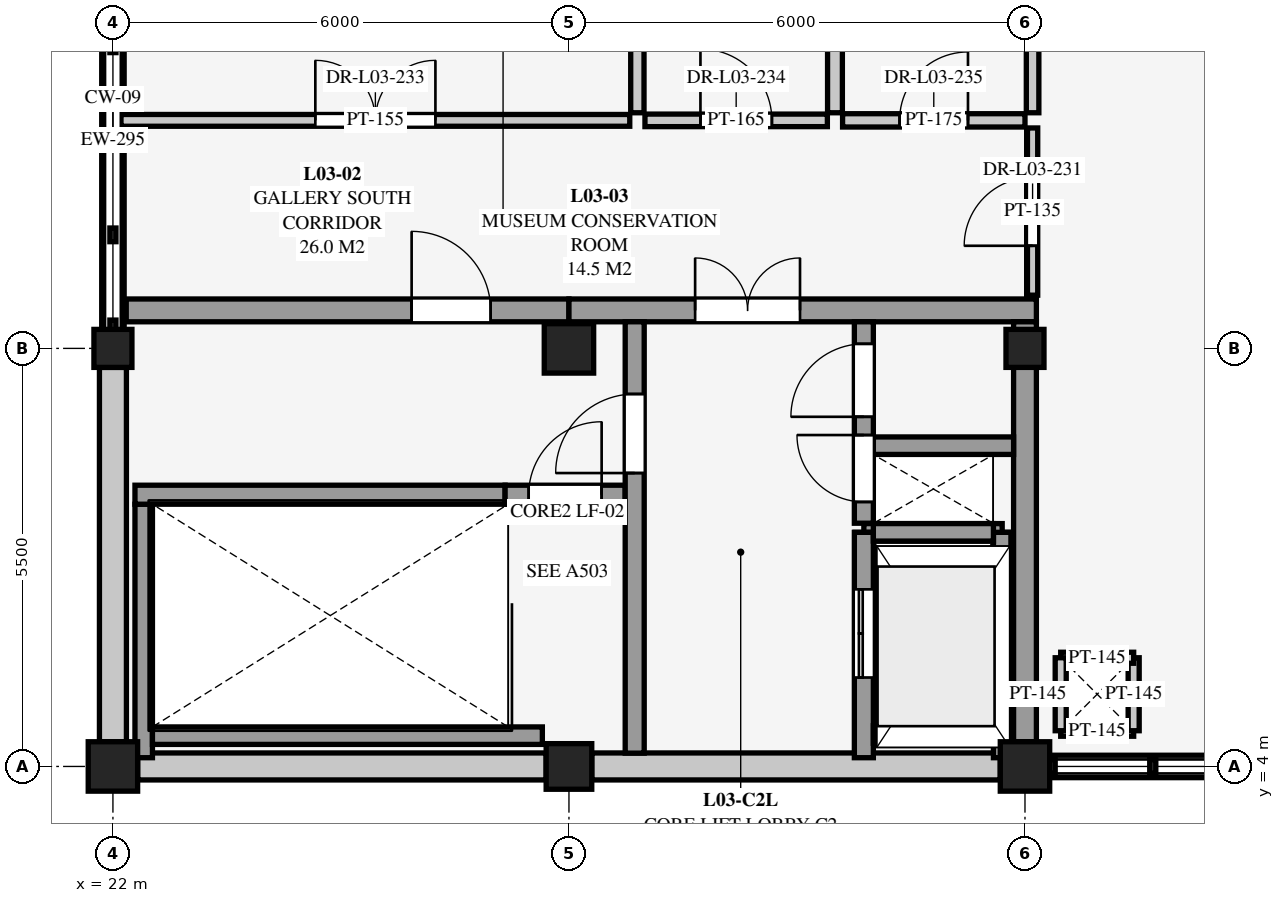
"""IFC4 building model, lengths in metres.
Left out: names, types, materials, properties, quantities, classifications, styles, units other than length and angle.
Written with IfcOpenShell. Run it as: python <this file> out.ifc"""

import sys

from ifc_helpers import new_model, si_unit, direction, frame, frame_2d, origin, origin_2d, place, context, subcontext, project, spatial, rectangle, extrude, element, fill, save


model = new_model("IFC4")
c1 = context("Model", 3, precision=1e-05, world=origin(), true_north=direction((0.0, 1.0)))
c2 = subcontext(c1, "Body", "Model", "MODEL_VIEW")
j1 = project(units=[si_unit("LENGTHUNIT", "METRE"), si_unit("PLANEANGLEUNIT", "RADIAN")], contexts=[c1])
p1 = place(None, origin())
s1 = spatial("IfcSite", under=j1, at=p1, CompositionType="ELEMENT")
p2 = place(p1, origin())
s2 = spatial("IfcBuilding", under=s1, at=p2, CompositionType="ELEMENT")
p3 = place(p2, frame((0.0, 0.0, 9.0)))
s3 = spatial("IfcBuildingStorey", under=s2, at=p3, CompositionType="ELEMENT", Elevation=9.0)
p4 = place(p3, frame((22.0, 4.0, 0.0), z_axis=(0.0, 0.0, 1.0), x_axis=(1.0, 0.0, 0.0)))
e1 = element("IfcColumn", 1, at=p4, inside=s3, PredefinedType="COLUMN", context=c2, shape_type="SweptSolid", body=[
    extrude(rectangle(XDim=0.65, YDim=0.65, at=origin_2d()), origin(), (0.0, 0.0, 1.0), 4.5),
])
p5 = place(p3, frame((22.0, 9.5, 0.0), z_axis=(0.0, 0.0, 1.0), x_axis=(1.0, 0.0, 0.0)))
e2 = element("IfcColumn", 2, at=p5, inside=s3, PredefinedType="COLUMN", context=c2, shape_type="SweptSolid", body=[
    extrude(rectangle(XDim=0.5, YDim=0.5, at=origin_2d()), origin(), (0.0, 0.0, 1.0), 4.5),
])
p6 = place(p3, frame((28.0, 4.0, 0.0), z_axis=(0.0, 0.0, 1.0), x_axis=(1.0, 0.0, 0.0)))
e3 = element("IfcColumn", 3, at=p6, inside=s3, PredefinedType="COLUMN", context=c2, shape_type="SweptSolid", body=[
    extrude(rectangle(XDim=0.6, YDim=0.6, at=origin_2d()), origin(), (0.0, 0.0, 1.0), 4.5),
])
for number, where, z_axis, x_axis in (
    (4, (28.0, 9.5, 0.0), (0.0, 0.0, 1.0), (1.0, 0.0, 0.0)),
    (5, (34.0, 4.0, 0.0), (0.0, 0.0, 1.0), (1.0, 0.0, 0.0)),
):
    element("IfcColumn", number, at=place(p3, frame(where, z_axis=z_axis, x_axis=x_axis)), inside=s3, PredefinedType="COLUMN", context=c2, shape_type="SweptSolid", body=[
        extrude(rectangle(XDim=0.65, YDim=0.65, at=origin_2d()), origin(), (0.0, 0.0, 1.0), 4.5),
    ])
p7 = place(p3, frame((34.0, 9.5, 0.0), z_axis=(0.0, 0.0, 1.0), x_axis=(1.0, 0.0, 0.0)))
e6 = element("IfcColumn", 6, at=p7, inside=s3, PredefinedType="COLUMN", context=c2, shape_type="SweptSolid", body=[
    extrude(rectangle(XDim=0.5, YDim=0.5, at=origin_2d()), origin(), (0.0, 0.0, 1.0), 4.5),
])
for number, where, z_axis, x_axis in (
    (7, (27.7, 4.0, 0.0), (0.0, 0.0, 1.0), (-1.0, 0.0, 0.0)),
    (8, (33.675, 4.0, 0.0), (0.0, 0.0, 1.0), (-1.0, 0.0, 0.0)),
):
    element("IfcWall", number, at=place(p3, frame(where, z_axis=z_axis, x_axis=x_axis)), inside=s3, PredefinedType="SOLIDWALL", context=c2, shape_type="SweptSolid", body=[
        extrude(rectangle(XDim=5.375, YDim=0.355, at=frame_2d((2.688, 0.0))), origin(), (0.0, 0.0, 1.0), 4.093),
    ])
p8 = place(p3, frame((39.75, 4.0, 0.0), z_axis=(0.0, 0.0, 1.0), x_axis=(-1.0, 0.0, 0.0)))
e9 = element("IfcWall", 9, at=p8, inside=s3, PredefinedType="SOLIDWALL", context=c2, shape_type="SweptSolid", body=[
    extrude(rectangle(XDim=5.425, YDim=0.295, at=frame_2d((2.712, 0.0))), origin(), (0.0, 0.0, 1.0), 0.36),
])
p9 = place(p3, frame((22.0, 4.325, 0.0), z_axis=(0.0, 0.0, 1.0), x_axis=(0.0, 1.0, 0.0)))
e10 = element("IfcWall", 10, at=p9, inside=s3, PredefinedType="SOLIDWALL", context=c2, shape_type="SweptSolid", body=[
    extrude(rectangle(XDim=4.925, YDim=0.355, at=frame_2d((2.462, 0.0))), origin(), (0.0, 0.0, 1.0), 4.093),
])
p10 = place(p3, frame((22.0, 9.75, 0.0), z_axis=(0.0, 0.0, 1.0), x_axis=(0.0, 1.0, 0.0)))
e11 = element("IfcWall", 11, at=p10, inside=s3, PredefinedType="SOLIDWALL", context=c2, shape_type="SweptSolid", body=[
    extrude(rectangle(XDim=4.975, YDim=0.295, at=frame_2d((2.488, 0.0))), origin(), (0.0, 0.0, 1.0), 0.16),
])
for number, where, z_axis, x_axis in (
    (12, (34.47, 4.47, 0.0), (0.0, 0.0, 1.0), (1.0, 0.0, 0.0)),
    (13, (35.43, 4.47, 0.0), (0.0, 0.0, 1.0), (0.0, 1.0, 0.0)),
    (14, (35.43, 5.43, 0.0), (0.0, 0.0, 1.0), (-1.0, 0.0, 0.0)),
    (15, (34.47, 5.43, 0.0), (0.0, 0.0, 1.0), (0.0, -1.0, 0.0)),
):
    element("IfcWall", number, at=place(p3, frame(where, z_axis=z_axis, x_axis=x_axis)), inside=s3, PredefinedType="PARTITIONING", context=c2, shape_type="SweptSolid", body=[
        extrude(rectangle(XDim=0.96, YDim=0.145, at=frame_2d((0.48, 0.0))), origin(), (0.0, 0.0, 1.0), 4.24),
    ])
p11 = place(p3, frame((31.88, 4.42, 4.5), z_axis=(0.0, 0.0, 1.0), x_axis=(1.0, 0.0, 0.0)))
e16 = element("IfcWall", 16, at=p11, inside=s3, PredefinedType="SHEAR", context=c2, shape_type="SweptSolid", body=[
    extrude(rectangle(XDim=1.82, YDim=0.23, at=frame_2d((0.91, 0.0))), origin(), (0.0, 0.0, 1.0), 1.25),
])
p12 = place(p3, frame((33.7, 4.42, 4.5), z_axis=(0.0, 0.0, 1.0), x_axis=(0.0, 1.0, 0.0)))
e17 = element("IfcWall", 17, at=p12, inside=s3, PredefinedType="SHEAR", context=c2, shape_type="SweptSolid", body=[
    extrude(rectangle(XDim=2.66, YDim=0.23, at=frame_2d((1.33, 0.0))), origin(), (0.0, 0.0, 1.0), 1.25),
])
p13 = place(p3, frame((33.7, 7.08, 4.5), z_axis=(0.0, 0.0, 1.0), x_axis=(-1.0, 0.0, 0.0)))
e18 = element("IfcWall", 18, at=p13, inside=s3, PredefinedType="SHEAR", context=c2, shape_type="SweptSolid", body=[
    extrude(rectangle(XDim=1.82, YDim=0.23, at=frame_2d((0.91, 0.0))), origin(), (0.0, 0.0, 1.0), 1.25),
])
p14 = place(p3, frame((31.88, 7.08, 4.5), z_axis=(0.0, 0.0, 1.0), x_axis=(0.0, -1.0, 0.0)))
e19 = element("IfcWall", 19, at=p14, inside=s3, PredefinedType="SHEAR", context=c2, shape_type="SweptSolid", body=[
    extrude(rectangle(XDim=2.66, YDim=0.23, at=frame_2d((1.33, 0.0))), origin(), (0.0, 0.0, 1.0), 1.25),
])
p15 = place(p3, frame((22.175, 10.0, 0.0), z_axis=(0.0, 0.0, 1.0), x_axis=(1.0, 0.0, 0.0)))
e20 = element("IfcWall", 20, at=p15, inside=s3, PredefinedType="SHEAR", context=c2, shape_type="SweptSolid", body=[
    extrude(rectangle(XDim=5.825, YDim=0.3, at=frame_2d((2.913, 0.0))), origin(), (0.0, 0.0, 1.0), 4.24),
])
p16 = place(p15, frame((3.755, 0.0, 0.0)))
e21 = element("IfcOpeningElement", 21, at=p16, cuts=e20, PredefinedType="OPENING", context=c2, shape_type="SweptSolid", body=[
    extrude(rectangle(XDim=1.04, YDim=2.14, at=frame_2d((0.52, 1.07))), frame((0.0, 0.16, 0.0), z_axis=(0.0, -1.0, 0.0), x_axis=(1.0, 0.0, 0.0)), (0.0, 0.0, 1.0), 0.32),
])
p17 = place(p3, frame((28.0, 10.0, 0.0), z_axis=(0.0, 0.0, 1.0), x_axis=(1.0, 0.0, 0.0)))
e22 = element("IfcWall", 22, at=p17, inside=s3, PredefinedType="SHEAR", context=c2, shape_type="SweptSolid", body=[
    extrude(rectangle(XDim=6.15, YDim=0.3, at=frame_2d((3.075, 0.0))), origin(), (0.0, 0.0, 1.0), 4.24),
])
p18 = place(p17, frame((1.66, 0.0, 0.0)))
e23 = element("IfcOpeningElement", 23, at=p18, cuts=e22, PredefinedType="OPENING", context=c2, shape_type="SweptSolid", body=[
    extrude(rectangle(XDim=1.38, YDim=2.16, at=frame_2d((0.69, 1.08))), frame((0.0, 0.16, 0.0), z_axis=(0.0, -1.0, 0.0), x_axis=(1.0, 0.0, 0.0)), (0.0, 0.0, 1.0), 0.32),
])
p19 = place(p3, frame((34.0, 4.325, 0.0), z_axis=(0.0, 0.0, 1.0), x_axis=(0.0, 1.0, 0.0)))
e24 = element("IfcWall", 24, at=p19, inside=s3, PredefinedType="SHEAR", context=c2, shape_type="SweptSolid", body=[
    extrude(rectangle(XDim=5.525, YDim=0.3, at=frame_2d((2.763, 0.0))), origin(), (0.0, 0.0, 1.0), 4.24),
])
p20 = place(p3, frame((22.405, 4.115, 0.0), z_axis=(0.0, 0.0, 1.0), x_axis=(0.0, 1.0, 0.0)))
e25 = element("IfcWall", 25, at=p20, inside=s3, PredefinedType="SHEAR", context=c2, shape_type="SweptSolid", body=[
    extrude(rectangle(XDim=3.335, YDim=0.23, at=frame_2d((1.667, 0.0))), origin(), (0.0, 0.0, 1.0), 4.5),
])
p21 = place(p3, frame((22.52, 4.405, 0.0), z_axis=(0.0, 0.0, 1.0), x_axis=(1.0, 0.0, 0.0)))
e26 = element("IfcWall", 26, at=p21, inside=s3, PredefinedType="SHEAR", context=c2, shape_type="SweptSolid", body=[
    extrude(rectangle(XDim=5.13, YDim=0.23, at=frame_2d((2.565, 0.0))), origin(), (0.0, 0.0, 1.0), 4.5),
])
p22 = place(p3, frame((22.29, 7.575, 0.0), z_axis=(0.0, 0.0, 1.0), x_axis=(1.0, 0.0, 0.0)))
e27 = element("IfcWall", 27, at=p22, inside=s3, PredefinedType="SHEAR", context=c2, shape_type="SweptSolid", body=[
    extrude(rectangle(XDim=4.87, YDim=0.25, at=frame_2d((2.435, 0.0))), origin(), (0.0, 0.0, 1.0), 4.5),
])
p23 = place(p3, frame((27.16, 7.575, 0.0), z_axis=(0.0, 0.0, 1.0), x_axis=(1.0, 0.0, 0.0)))
e28 = element("IfcWall", 28, at=p23, inside=s3, PredefinedType="SHEAR", context=c2, shape_type="SweptSolid", body=[
    extrude(rectangle(XDim=1.58, YDim=0.25, at=frame_2d((0.79, 0.0))), origin(), (0.0, 0.0, 1.0), 4.24),
])
p24 = place(p23, frame((0.31, 0.0, 0.0)))
e29 = element("IfcOpeningElement", 29, at=p24, cuts=e28, PredefinedType="OPENING", context=c2, shape_type="SweptSolid", body=[
    extrude(rectangle(XDim=0.96, YDim=2.12, at=frame_2d((0.48, 1.06))), frame((0.0, 0.135, 0.0), z_axis=(0.0, -1.0, 0.0), x_axis=(1.0, 0.0, 0.0)), (0.0, 0.0, 1.0), 0.27),
])
p25 = place(p3, frame((28.865, 4.175, 0.0), z_axis=(0.0, 0.0, 1.0), x_axis=(0.0, 1.0, 0.0)))
e30 = element("IfcWall", 30, at=p25, inside=s3, PredefinedType="SHEAR", context=c2, shape_type="SweptSolid", body=[
    extrude(rectangle(XDim=5.675, YDim=0.25, at=frame_2d((2.837, 0.0))), origin(), (0.0, 0.0, 1.0), 4.24),
])
p26 = place(p25, frame((3.685, 0.0, 0.0)))
e31 = element("IfcOpeningElement", 31, at=p26, cuts=e30, PredefinedType="OPENING", context=c2, shape_type="SweptSolid", body=[
    extrude(rectangle(XDim=1.04, YDim=2.14, at=frame_2d((0.52, 1.07))), frame((0.0, 0.135, 0.0), z_axis=(0.0, -1.0, 0.0), x_axis=(1.0, 0.0, 0.0)), (0.0, 0.0, 1.0), 0.27),
])
p27 = place(p3, frame((31.88, 4.115, 0.0), z_axis=(0.0, 0.0, 1.0), x_axis=(0.0, 1.0, 0.0)))
e32 = element("IfcWall", 32, at=p27, inside=s3, PredefinedType="SHEAR", context=c2, shape_type="SweptSolid", body=[
    extrude(rectangle(XDim=2.965, YDim=0.25, at=frame_2d((1.482, 0.0))), origin(), (0.0, 0.0, 1.0), 4.5),
])
p28 = place(p27, frame((1.055, 0.0, 0.0)))
e33 = element("IfcOpeningElement", 33, at=p28, cuts=e32, PredefinedType="OPENING", context=c2, shape_type="SweptSolid", body=[
    extrude(rectangle(XDim=1.16, YDim=2.18, at=frame_2d((0.58, 1.09))), frame((0.0, 0.135, 0.0), z_axis=(0.0, -1.0, 0.0), x_axis=(1.0, 0.0, 0.0)), (0.0, 0.0, 1.0), 0.27),
])
p29 = place(p3, frame((32.005, 4.42, 0.0), z_axis=(0.0, 0.0, 1.0), x_axis=(1.0, 0.0, 0.0)))
e34 = element("IfcWall", 34, at=p29, inside=s3, PredefinedType="SHEAR", context=c2, shape_type="SweptSolid", body=[
    extrude(rectangle(XDim=1.58, YDim=0.23, at=frame_2d((0.79, 0.0))), origin(), (0.0, 0.0, 1.0), 4.5),
])
p30 = place(p3, frame((33.7, 4.115, 0.0), z_axis=(0.0, 0.0, 1.0), x_axis=(0.0, 1.0, 0.0)))
e35 = element("IfcWall", 35, at=p30, inside=s3, PredefinedType="SHEAR", context=c2, shape_type="SweptSolid", body=[
    extrude(rectangle(XDim=2.965, YDim=0.23, at=frame_2d((1.482, 0.0))), origin(), (0.0, 0.0, 1.0), 4.5),
])
p31 = place(p3, frame((32.005, 7.08, 0.0), z_axis=(0.0, 0.0, 1.0), x_axis=(1.0, 0.0, 0.0)))
e36 = element("IfcWall", 36, at=p31, inside=s3, PredefinedType="SHEAR", context=c2, shape_type="SweptSolid", body=[
    extrude(rectangle(XDim=1.58, YDim=0.23, at=frame_2d((0.79, 0.0))), origin(), (0.0, 0.0, 1.0), 4.5),
])
p32 = place(p3, frame((31.88, 7.2, 0.0), z_axis=(0.0, 0.0, 1.0), x_axis=(0.0, 1.0, 0.0)))
e37 = element("IfcWall", 37, at=p32, inside=s3, PredefinedType="SHEAR", context=c2, shape_type="SweptSolid", body=[
    extrude(rectangle(XDim=2.65, YDim=0.25, at=frame_2d((1.325, 0.0))), origin(), (0.0, 0.0, 1.0), 4.24),
])
p33 = place(p32, frame((0.28, 0.0, 0.0)))
e38 = element("IfcOpeningElement", 38, at=p33, cuts=e37, PredefinedType="OPENING", context=c2, shape_type="SweptSolid", body=[
    extrude(rectangle(XDim=0.88, YDim=2.08, at=frame_2d((0.44, 1.04))), frame((0.0, 0.135, 0.0), z_axis=(0.0, -1.0, 0.0), x_axis=(1.0, 0.0, 0.0)), (0.0, 0.0, 1.0), 0.27),
])
p34 = place(p32, frame((1.4, 0.0, 0.0)))
e39 = element("IfcOpeningElement", 39, at=p34, cuts=e37, PredefinedType="OPENING", context=c2, shape_type="SweptSolid", body=[
    extrude(rectangle(XDim=0.96, YDim=2.12, at=frame_2d((0.48, 1.06))), frame((0.0, 0.135, 0.0), z_axis=(0.0, -1.0, 0.0), x_axis=(1.0, 0.0, 0.0)), (0.0, 0.0, 1.0), 0.27),
])
p35 = place(p3, frame((32.005, 8.22, 0.0), z_axis=(0.0, 0.0, 1.0), x_axis=(1.0, 0.0, 0.0)))
e40 = element("IfcWall", 40, at=p35, inside=s3, PredefinedType="SHEAR", context=c2, shape_type="SweptSolid", body=[
    extrude(rectangle(XDim=1.845, YDim=0.23, at=frame_2d((0.923, 0.0))), origin(), (0.0, 0.0, 1.0), 4.24),
])
p36 = place(p3, frame((34.1, 10.2, 0.0), z_axis=(0.0, 0.0, 1.0), x_axis=(0.0, 1.0, 0.0)))
e41 = element("IfcWall", 41, at=p36, inside=s3, PredefinedType="PARTITIONING", context=c2, shape_type="SweptSolid", body=[
    extrude(rectangle(XDim=2.2, YDim=0.135, at=frame_2d((1.1, 0.0))), origin(), (0.0, 0.0, 1.0), 4.24),
])
p37 = place(p36, frame((0.65, 0.0, 0.0)))
e42 = element("IfcOpeningElement", 42, at=p37, cuts=e41, PredefinedType="OPENING", context=c2, shape_type="SweptSolid", body=[
    extrude(rectangle(XDim=0.9, YDim=2.1, at=frame_2d((0.45, 1.05))), frame((0.0, 0.077, 0.0), z_axis=(0.0, -1.0, 0.0), x_axis=(1.0, 0.0, 0.0)), (0.0, 0.0, 1.0), 0.155),
])
p38 = place(p3, frame((34.1, 12.6, 0.0), z_axis=(0.0, 0.0, 1.0), x_axis=(0.0, 1.0, 0.0)))
e43 = element("IfcWall", 43, at=p38, inside=s3, PredefinedType="PARTITIONING", context=c2, shape_type="SweptSolid", body=[
    extrude(rectangle(XDim=2.123, YDim=0.165, at=frame_2d((1.062, 0.0))), origin(), (0.0, 0.0, 1.0), 4.24),
])
p39 = place(p3, frame((22.106, 12.5, 0.0), z_axis=(0.0, 0.0, 1.0), x_axis=(1.0, 0.0, 0.0)))
e44 = element("IfcWall", 44, at=p39, inside=s3, PredefinedType="PARTITIONING", context=c2, shape_type="SweptSolid", body=[
    extrude(rectangle(XDim=6.694, YDim=0.155, at=frame_2d((3.347, 0.0))), origin(), (0.0, 0.0, 1.0), 4.24),
])
p40 = place(p39, frame((2.557, 0.0, 0.0)))
e45 = element("IfcOpeningElement", 45, at=p40, cuts=e44, PredefinedType="OPENING", context=c2, shape_type="SweptSolid", body=[
    extrude(rectangle(XDim=1.58, YDim=2.2, at=frame_2d((0.79, 1.1))), frame((0.0, 0.088, 0.0), z_axis=(0.0, -1.0, 0.0), x_axis=(1.0, 0.0, 0.0)), (0.0, 0.0, 1.0), 0.175),
])
p41 = place(p3, frame((29.0, 12.5, 0.0), z_axis=(0.0, 0.0, 1.0), x_axis=(1.0, 0.0, 0.0)))
e46 = element("IfcWall", 46, at=p41, inside=s3, PredefinedType="PARTITIONING", context=c2, shape_type="SweptSolid", body=[
    extrude(rectangle(XDim=2.4, YDim=0.165, at=frame_2d((1.2, 0.0))), origin(), (0.0, 0.0, 1.0), 4.24),
])
p42 = place(p41, frame((0.73, 0.0, 0.0)))
e47 = element("IfcOpeningElement", 47, at=p42, cuts=e46, PredefinedType="OPENING", context=c2, shape_type="SweptSolid", body=[
    extrude(rectangle(XDim=0.94, YDim=2.1, at=frame_2d((0.47, 1.05))), frame((0.0, 0.093, 0.0), z_axis=(0.0, -1.0, 0.0), x_axis=(1.0, 0.0, 0.0)), (0.0, 0.0, 1.0), 0.185),
])
p43 = place(p3, frame((31.6, 12.5, 0.0), z_axis=(0.0, 0.0, 1.0), x_axis=(1.0, 0.0, 0.0)))
e48 = element("IfcWall", 48, at=p43, inside=s3, PredefinedType="PARTITIONING", context=c2, shape_type="SweptSolid", body=[
    extrude(rectangle(XDim=2.4, YDim=0.175, at=frame_2d((1.2, 0.0))), origin(), (0.0, 0.0, 1.0), 4.24),
])
p44 = place(p43, frame((0.75, 0.0, 0.0)))
e49 = element("IfcOpeningElement", 49, at=p44, cuts=e48, PredefinedType="OPENING", context=c2, shape_type="SweptSolid", body=[
    extrude(rectangle(XDim=0.9, YDim=2.1, at=frame_2d((0.45, 1.05))), frame((0.0, 0.097, 0.0), z_axis=(0.0, -1.0, 0.0), x_axis=(1.0, 0.0, 0.0)), (0.0, 0.0, 1.0), 0.195),
])
p45 = place(p3, frame((28.9, 12.6, 0.0), z_axis=(0.0, 0.0, 1.0), x_axis=(0.0, 1.0, 0.0)))
e50 = element("IfcWall", 50, at=p45, inside=s3, PredefinedType="PARTITIONING", context=c2, shape_type="SweptSolid", body=[
    extrude(rectangle(XDim=2.309, YDim=0.175, at=frame_2d((1.154, 0.0))), origin(), (0.0, 0.0, 1.0), 4.24),
])
p46 = place(p3, frame((31.5, 12.6, 0.0), z_axis=(0.0, 0.0, 1.0), x_axis=(0.0, 1.0, 0.0)))
e51 = element("IfcWall", 51, at=p46, inside=s3, PredefinedType="PARTITIONING", context=c2, shape_type="SweptSolid", body=[
    extrude(rectangle(XDim=2.309, YDim=0.195, at=frame_2d((1.154, 0.0))), origin(), (0.0, 0.0, 1.0), 4.24),
])
p47 = place(p16, origin())
e52 = element("IfcDoor", 52, at=p47, inside=s3, OperationType="SINGLE_SWING_LEFT", PredefinedType="DOOR", context=c2, shape_type="SweptSolid", body=[
    extrude(rectangle(XDim=1.04, YDim=2.14, at=frame_2d((0.52, 1.07))), frame((0.0, 0.025, 0.0), z_axis=(0.0, -1.0, 0.0), x_axis=(1.0, 0.0, 0.0)), (0.0, 0.0, 1.0), 0.05),
])
fill(e21, e52)
p48 = place(p18, origin())
e53 = element("IfcDoor", 53, at=p48, inside=s3, OperationType="DOUBLE_DOOR_SINGLE_SWING", PredefinedType="DOOR", context=c2, shape_type="SweptSolid", body=[
    extrude(rectangle(XDim=1.38, YDim=2.16, at=frame_2d((0.69, 1.08))), frame((0.0, 0.025, 0.0), z_axis=(0.0, -1.0, 0.0), x_axis=(1.0, 0.0, 0.0)), (0.0, 0.0, 1.0), 0.05),
])
fill(e23, e53)
p49 = place(p24, origin())
e54 = element("IfcDoor", 54, at=p49, inside=s3, OperationType="SINGLE_SWING_RIGHT", PredefinedType="DOOR", context=c2, shape_type="SweptSolid", body=[
    extrude(rectangle(XDim=0.96, YDim=2.12, at=frame_2d((0.48, 1.06))), frame((0.0, 0.025, 0.0), z_axis=(0.0, -1.0, 0.0), x_axis=(1.0, 0.0, 0.0)), (0.0, 0.0, 1.0), 0.05),
])
fill(e29, e54)
p50 = place(p26, origin())
e55 = element("IfcDoor", 55, at=p50, inside=s3, OperationType="SINGLE_SWING_LEFT", PredefinedType="DOOR", context=c2, shape_type="SweptSolid", body=[
    extrude(rectangle(XDim=1.04, YDim=2.14, at=frame_2d((0.52, 1.07))), frame((0.0, 0.025, 0.0), z_axis=(0.0, -1.0, 0.0), x_axis=(1.0, 0.0, 0.0)), (0.0, 0.0, 1.0), 0.05),
])
fill(e31, e55)
p51 = place(p28, origin())
e56 = element("IfcDoor", 56, at=p51, inside=s3, OperationType="DOUBLE_DOOR_SLIDING", PredefinedType="DOOR", context=c2, shape_type="SweptSolid", body=[
    extrude(rectangle(XDim=1.16, YDim=2.18, at=frame_2d((0.58, 1.09))), frame((0.0, 0.025, 0.0), z_axis=(0.0, -1.0, 0.0), x_axis=(1.0, 0.0, 0.0)), (0.0, 0.0, 1.0), 0.05),
])
fill(e33, e56)
p52 = place(p33, origin())
e57 = element("IfcDoor", 57, at=p52, inside=s3, OperationType="SINGLE_SWING_RIGHT", PredefinedType="DOOR", context=c2, shape_type="SweptSolid", body=[
    extrude(rectangle(XDim=0.88, YDim=2.08, at=frame_2d((0.44, 1.04))), frame((0.0, 0.025, 0.0), z_axis=(0.0, -1.0, 0.0), x_axis=(1.0, 0.0, 0.0)), (0.0, 0.0, 1.0), 0.05),
])
fill(e38, e57)
p53 = place(p34, origin())
e58 = element("IfcDoor", 58, at=p53, inside=s3, OperationType="SINGLE_SWING_LEFT", PredefinedType="DOOR", context=c2, shape_type="SweptSolid", body=[
    extrude(rectangle(XDim=0.96, YDim=2.12, at=frame_2d((0.48, 1.06))), frame((0.0, 0.025, 0.0), z_axis=(0.0, -1.0, 0.0), x_axis=(1.0, 0.0, 0.0)), (0.0, 0.0, 1.0), 0.05),
])
fill(e39, e58)
p54 = place(p37, origin())
e59 = element("IfcDoor", 59, at=p54, inside=s3, OperationType="SINGLE_SWING_LEFT", PredefinedType="DOOR", context=c2, shape_type="SweptSolid", body=[
    extrude(rectangle(XDim=0.9, YDim=2.1, at=frame_2d((0.45, 1.05))), frame((0.0, 0.025, 0.0), z_axis=(0.0, -1.0, 0.0), x_axis=(1.0, 0.0, 0.0)), (0.0, 0.0, 1.0), 0.05),
])
fill(e42, e59)
p55 = place(p40, origin())
e60 = element("IfcDoor", 60, at=p55, inside=s3, OperationType="DOUBLE_DOOR_SINGLE_SWING", PredefinedType="DOOR", context=c2, shape_type="SweptSolid", body=[
    extrude(rectangle(XDim=1.58, YDim=2.2, at=frame_2d((0.79, 1.1))), frame((0.0, 0.025, 0.0), z_axis=(0.0, -1.0, 0.0), x_axis=(1.0, 0.0, 0.0)), (0.0, 0.0, 1.0), 0.05),
])
fill(e45, e60)
p56 = place(p42, origin())
e61 = element("IfcDoor", 61, at=p56, inside=s3, OperationType="SINGLE_SWING_LEFT", PredefinedType="DOOR", context=c2, shape_type="SweptSolid", body=[
    extrude(rectangle(XDim=0.94, YDim=2.1, at=frame_2d((0.47, 1.05))), frame((0.0, 0.025, 0.0), z_axis=(0.0, -1.0, 0.0), x_axis=(1.0, 0.0, 0.0)), (0.0, 0.0, 1.0), 0.05),
])
fill(e47, e61)
p57 = place(p44, origin())
e62 = element("IfcDoor", 62, at=p57, inside=s3, OperationType="SINGLE_SWING_RIGHT", PredefinedType="DOOR", context=c2, shape_type="SweptSolid", body=[
    extrude(rectangle(XDim=0.9, YDim=2.1, at=frame_2d((0.45, 1.05))), frame((0.0, 0.025, 0.0), z_axis=(0.0, -1.0, 0.0), x_axis=(1.0, 0.0, 0.0)), (0.0, 0.0, 1.0), 0.05),
])
fill(e49, e62)
save(model, sys.argv[1])
